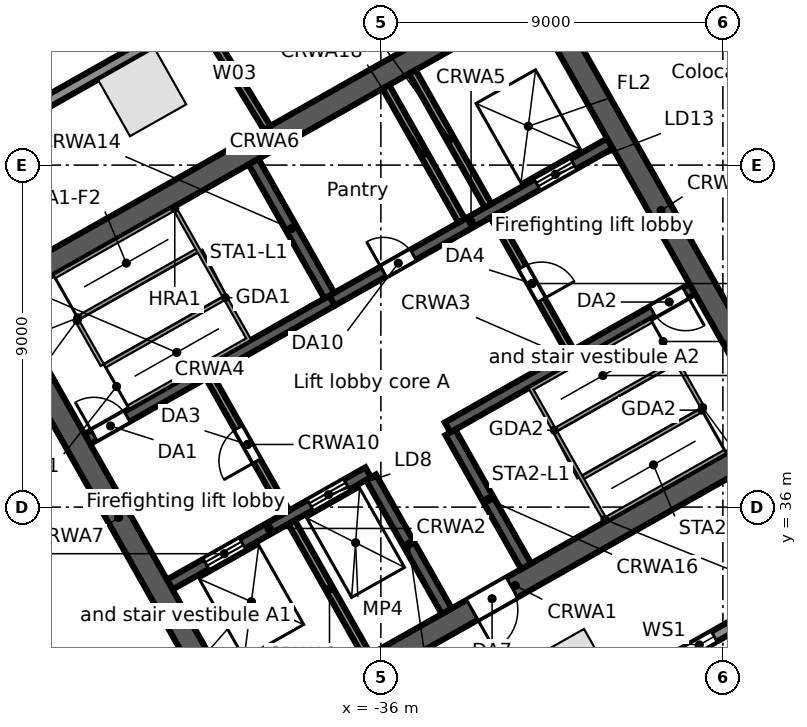
"""IFC4 building model, lengths in metres.
Left out: names, types, materials, properties, quantities, classifications, styles, units other than length and angle.
Written with IfcOpenShell. Run it as: python <this file> out.ifc"""

import sys

from ifc_helpers import new_model, si_unit, direction, frame, frame_2d, origin, origin_2d, place, context, subcontext, project, spatial, rectangle, extrude, element, fill, save


model = new_model("IFC4")
c1 = context("Model", 3, precision=1e-05, world=origin(), true_north=direction((0.0, 1.0)))
c2 = subcontext(c1, "Body", "Model", "MODEL_VIEW")
j1 = project(units=[si_unit("LENGTHUNIT", "METRE"), si_unit("PLANEANGLEUNIT", "RADIAN")], contexts=[c1])
p1 = place(None, origin())
s1 = spatial("IfcSite", under=j1, at=p1, CompositionType="ELEMENT")
p2 = place(p1, origin())
s2 = spatial("IfcBuilding", under=s1, at=p2, CompositionType="ELEMENT")
p3 = place(p2, frame((0.0, 0.0, 36.5)))
s3 = spatial("IfcBuildingStorey", under=s2, at=p3, CompositionType="ELEMENT", Elevation=36.5)
for number, where, z_axis, x_axis in (
    (1, (-42.28, 46.919, 0.0), (0.0, 0.0, 1.0), (-0.87, -0.492, 0.0)),
    (2, (-30.976, 31.635, 0.0), (0.0, 0.0, 1.0), (0.87, 0.492, 0.0)),
):
    element("IfcColumn", number, at=place(p3, frame(where, z_axis=z_axis, x_axis=x_axis)), inside=s3, PredefinedType="COLUMN", context=c2, shape_type="SweptSolid", body=[
        extrude(rectangle(XDim=1.7, YDim=1.7, at=origin_2d()), origin(), (0.0, 0.0, 1.0), 5.0),
    ])
p4 = place(p3, frame((-58.745, 38.764, 0.0), z_axis=(0.0, 0.0, 1.0), x_axis=(0.870355811726, 0.492423355453, 0.0)))
e3 = element("IfcWall", 3, at=p4, inside=s3, PredefinedType="STANDARD", context=c2, shape_type="SweptSolid", body=[
    extrude(rectangle(XDim=64.025, YDim=0.3, at=frame_2d((32.013, 0.0))), origin(), (0.0, 0.0, 1.0), 4.68),
])
p5 = place(p4, frame((60.122, 0.0, 0.6)))
e4 = element("IfcOpeningElement", 4, at=p5, cuts=e3, PredefinedType="OPENING", context=c2, shape_type="SweptSolid", body=[
    extrude(rectangle(XDim=0.9, YDim=3.2, at=frame_2d((0.45, 1.6))), frame((0.0, 0.16, 0.0), z_axis=(0.0, -1.0, 0.0), x_axis=(1.0, 0.0, 0.0)), (0.0, 0.0, 1.0), 0.32),
])
p6 = place(p4, frame((50.992, 0.0, 0.6)))
e5 = element("IfcOpeningElement", 5, at=p6, cuts=e3, PredefinedType="OPENING", context=c2, shape_type="SweptSolid", body=[
    extrude(rectangle(XDim=0.9, YDim=3.2, at=frame_2d((0.45, 1.6))), frame((0.0, 0.16, 0.0), z_axis=(0.0, -1.0, 0.0), x_axis=(1.0, 0.0, 0.0)), (0.0, 0.0, 1.0), 0.32),
])
p7 = place(p4, frame((41.862, 0.0, 0.6)))
e6 = element("IfcOpeningElement", 6, at=p7, cuts=e3, PredefinedType="OPENING", context=c2, shape_type="SweptSolid", body=[
    extrude(rectangle(XDim=0.9, YDim=3.2, at=frame_2d((0.45, 1.6))), frame((0.0, 0.16, 0.0), z_axis=(0.0, -1.0, 0.0), x_axis=(1.0, 0.0, 0.0)), (0.0, 0.0, 1.0), 0.32),
])
p8 = place(p4, frame((32.732, 0.0, 0.6)))
e7 = element("IfcOpeningElement", 7, at=p8, cuts=e3, PredefinedType="OPENING", context=c2, shape_type="SweptSolid", body=[
    extrude(rectangle(XDim=0.9, YDim=3.2, at=frame_2d((0.45, 1.6))), frame((0.0, 0.16, 0.0), z_axis=(0.0, -1.0, 0.0), x_axis=(1.0, 0.0, 0.0)), (0.0, 0.0, 1.0), 0.32),
])
p9 = place(p4, frame((23.602, 0.0, 0.6)))
e8 = element("IfcOpeningElement", 8, at=p9, cuts=e3, PredefinedType="OPENING", context=c2, shape_type="SweptSolid", body=[
    extrude(rectangle(XDim=0.9, YDim=3.2, at=frame_2d((0.45, 1.6))), frame((0.0, 0.16, 0.0), z_axis=(0.0, -1.0, 0.0), x_axis=(1.0, 0.0, 0.0)), (0.0, 0.0, 1.0), 0.32),
])
p10 = place(p4, frame((14.472, 0.0, 0.6)))
e9 = element("IfcOpeningElement", 9, at=p10, cuts=e3, PredefinedType="OPENING", context=c2, shape_type="SweptSolid", body=[
    extrude(rectangle(XDim=0.9, YDim=3.2, at=frame_2d((0.45, 1.6))), frame((0.0, 0.16, 0.0), z_axis=(0.0, -1.0, 0.0), x_axis=(1.0, 0.0, 0.0)), (0.0, 0.0, 1.0), 0.32),
])
p11 = place(p4, frame((5.342, 0.0, 0.6)))
e10 = element("IfcOpeningElement", 10, at=p11, cuts=e3, PredefinedType="OPENING", context=c2, shape_type="SweptSolid", body=[
    extrude(rectangle(XDim=0.9, YDim=3.2, at=frame_2d((0.45, 1.6))), frame((0.0, 0.16, 0.0), z_axis=(0.0, -1.0, 0.0), x_axis=(1.0, 0.0, 0.0)), (0.0, 0.0, 1.0), 0.32),
])
p12 = place(p3, frame((-44.109, 26.504, 0.0), z_axis=(0.0, 0.0, 1.0), x_axis=(-0.857169502585, 0.515034410344, 0.0)))
e11 = element("IfcWall", 11, at=p12, inside=s3, PredefinedType="STANDARD", context=c2, shape_type="SweptSolid", body=[
    extrude(rectangle(XDim=17.127, YDim=0.3, at=frame_2d((8.563, 0.0))), origin(), (0.0, 0.0, 1.0), 4.68),
])
p13 = place(p12, frame((13.403, 0.0, 0.6)))
e12 = element("IfcOpeningElement", 12, at=p13, cuts=e11, PredefinedType="OPENING", context=c2, shape_type="SweptSolid", body=[
    extrude(rectangle(XDim=0.9, YDim=3.2, at=frame_2d((0.45, 1.6))), frame((0.0, 0.16, 0.0), z_axis=(0.0, -1.0, 0.0), x_axis=(1.0, 0.0, 0.0)), (0.0, 0.0, 1.0), 0.32),
])
p14 = place(p12, frame((4.903, 0.0, 0.6)))
e13 = element("IfcOpeningElement", 13, at=p14, cuts=e11, PredefinedType="OPENING", context=c2, shape_type="SweptSolid", body=[
    extrude(rectangle(XDim=0.9, YDim=3.2, at=frame_2d((0.45, 1.6))), frame((0.0, 0.16, 0.0), z_axis=(0.0, -1.0, 0.0), x_axis=(1.0, 0.0, 0.0)), (0.0, 0.0, 1.0), 0.32),
])
p15 = place(p3, frame((-0.055, 47.969, 0.0), z_axis=(0.0, 0.0, 1.0), x_axis=(-0.870355730478, -0.492423499058, 0.0)))
e14 = element("IfcWall", 14, at=p15, inside=s3, PredefinedType="STANDARD", context=c2, shape_type="SweptSolid", body=[
    extrude(rectangle(XDim=43.75, YDim=0.3, at=frame_2d((21.875, 0.0))), origin(), (0.0, 0.0, 1.0), 4.68),
])
p16 = place(p15, frame((39.977, 0.0, 0.6)))
e15 = element("IfcOpeningElement", 15, at=p16, cuts=e14, PredefinedType="OPENING", context=c2, shape_type="SweptSolid", body=[
    extrude(rectangle(XDim=0.9, YDim=3.2, at=frame_2d((0.45, 1.6))), frame((0.0, 0.16, 0.0), z_axis=(0.0, -1.0, 0.0), x_axis=(1.0, 0.0, 0.0)), (0.0, 0.0, 1.0), 0.32),
])
p17 = place(p15, frame((31.222, 0.0, 0.6)))
e16 = element("IfcOpeningElement", 16, at=p17, cuts=e14, PredefinedType="OPENING", context=c2, shape_type="SweptSolid", body=[
    extrude(rectangle(XDim=0.9, YDim=3.2, at=frame_2d((0.45, 1.6))), frame((0.0, 0.16, 0.0), z_axis=(0.0, -1.0, 0.0), x_axis=(1.0, 0.0, 0.0)), (0.0, 0.0, 1.0), 0.32),
])
p18 = place(p15, frame((22.468, 0.0, 0.6)))
e17 = element("IfcOpeningElement", 17, at=p18, cuts=e14, PredefinedType="OPENING", context=c2, shape_type="SweptSolid", body=[
    extrude(rectangle(XDim=0.9, YDim=3.2, at=frame_2d((0.45, 1.6))), frame((0.0, 0.16, 0.0), z_axis=(0.0, -1.0, 0.0), x_axis=(1.0, 0.0, 0.0)), (0.0, 0.0, 1.0), 0.32),
])
p19 = place(p15, frame((13.713, 0.0, 0.6)))
e18 = element("IfcOpeningElement", 18, at=p19, cuts=e14, PredefinedType="OPENING", context=c2, shape_type="SweptSolid", body=[
    extrude(rectangle(XDim=0.9, YDim=3.2, at=frame_2d((0.45, 1.6))), frame((0.0, 0.16, 0.0), z_axis=(0.0, -1.0, 0.0), x_axis=(1.0, 0.0, 0.0)), (0.0, 0.0, 1.0), 0.32),
])
p20 = place(p15, frame((4.959, 0.0, 0.6)))
e19 = element("IfcOpeningElement", 19, at=p20, cuts=e14, PredefinedType="OPENING", context=c2, shape_type="SweptSolid", body=[
    extrude(rectangle(XDim=0.9, YDim=3.2, at=frame_2d((0.45, 1.6))), frame((0.0, 0.16, 0.0), z_axis=(0.0, -1.0, 0.0), x_axis=(1.0, 0.0, 0.0)), (0.0, 0.0, 1.0), 0.32),
])
p21 = place(p3, frame((-39.862, 29.749, 0.0), z_axis=(0.0, 0.0, 1.0), x_axis=(0.870350116061, 0.492433422375, 0.0)))
e20 = element("IfcWall", 20, at=p21, inside=s3, PredefinedType="SOLIDWALL", context=c2, shape_type="SweptSolid", body=[
    extrude(rectangle(XDim=17.0, YDim=0.6, at=frame_2d((8.5, 0.0))), origin(), (0.0, 0.0, 1.0), 4.68),
])
p22 = place(p21, frame((7.2, 0.0, 0.0)))
e21 = element("IfcOpeningElement", 21, at=p22, cuts=e20, PredefinedType="OPENING", context=c2, shape_type="SweptSolid", body=[
    extrude(rectangle(XDim=1.2, YDim=2.1, at=frame_2d((0.6, 1.05))), frame((0.0, 0.31, 0.0), z_axis=(0.0, -1.0, 0.0), x_axis=(1.0, 0.0, 0.0)), (0.0, 0.0, 1.0), 0.62),
])
p23 = place(p3, frame((-41.556, 33.961, 0.0), z_axis=(0.0, 0.0, 1.0), x_axis=(0.870343731308, 0.492444706919, 0.0)))
e22 = element("IfcWall", 22, at=p23, inside=s3, PredefinedType="SOLIDWALL", context=c2, shape_type="SweptSolid", body=[
    extrude(rectangle(XDim=6.0, YDim=0.3, at=frame_2d((3.0, 0.0))), origin(), (0.0, 0.0, 1.0), 4.68),
])
p24 = place(p23, frame((1.1, 0.0, 0.0)))
e23 = element("IfcOpeningElement", 23, at=p24, cuts=e22, PredefinedType="OPENING", context=c2, shape_type="SweptSolid", body=[
    extrude(rectangle(XDim=1.1, YDim=2.1, at=frame_2d((0.55, 1.05))), frame((0.0, 0.16, 0.0), z_axis=(0.0, -1.0, 0.0), x_axis=(1.0, 0.0, 0.0)), (0.0, 0.0, 1.0), 0.32),
])
p25 = place(p23, frame((4.25, 0.0, 0.0)))
e24 = element("IfcOpeningElement", 24, at=p25, cuts=e22, PredefinedType="OPENING", context=c2, shape_type="SweptSolid", body=[
    extrude(rectangle(XDim=1.1, YDim=2.1, at=frame_2d((0.55, 1.05))), frame((0.0, 0.16, 0.0), z_axis=(0.0, -1.0, 0.0), x_axis=(1.0, 0.0, 0.0)), (0.0, 0.0, 1.0), 0.32),
])
p26 = place(p3, frame((-34.245, 38.097, 0.0), z_axis=(0.0, 0.0, 1.0), x_axis=(0.870364910201, 0.492407273597, 0.0)))
e25 = element("IfcWall", 25, at=p26, inside=s3, PredefinedType="SOLIDWALL", context=c2, shape_type="SweptSolid", body=[
    extrude(rectangle(XDim=7.4, YDim=0.3, at=frame_2d((3.7, 0.0))), origin(), (0.0, 0.0, 1.0), 4.68),
])
p27 = place(p26, frame((6.2, 0.0, 0.0)))
e26 = element("IfcOpeningElement", 26, at=p27, cuts=e25, PredefinedType="OPENING", context=c2, shape_type="SweptSolid", body=[
    extrude(rectangle(XDim=1.0, YDim=2.1, at=frame_2d((0.5, 1.05))), frame((0.0, 0.16, 0.0), z_axis=(0.0, -1.0, 0.0), x_axis=(1.0, 0.0, 0.0)), (0.0, 0.0, 1.0), 0.32),
])
p28 = place(p3, frame((-43.723, 37.791, 0.0), z_axis=(0.0, 0.0, 1.0), x_axis=(0.87035077051, 0.49243226567, 0.0)))
e27 = element("IfcWall", 27, at=p28, inside=s3, PredefinedType="SOLIDWALL", context=c2, shape_type="SweptSolid", body=[
    extrude(rectangle(XDim=7.4, YDim=0.3, at=frame_2d((3.7, 0.0))), origin(), (0.0, 0.0, 1.0), 4.68),
])
p29 = place(p28, frame((0.2, 0.0, 0.0)))
e28 = element("IfcOpeningElement", 28, at=p29, cuts=e27, PredefinedType="OPENING", context=c2, shape_type="SweptSolid", body=[
    extrude(rectangle(XDim=1.0, YDim=2.1, at=frame_2d((0.5, 1.05))), frame((0.0, 0.16, 0.0), z_axis=(0.0, -1.0, 0.0), x_axis=(1.0, 0.0, 0.0)), (0.0, 0.0, 1.0), 0.32),
])
p30 = place(p3, frame((-37.282, 41.435, 0.0), z_axis=(0.0, 0.0, 1.0), x_axis=(0.870356516133, 0.492422110414, 0.0)))
e29 = element("IfcWall", 29, at=p30, inside=s3, PredefinedType="SOLIDWALL", context=c2, shape_type="SweptSolid", body=[
    extrude(rectangle(XDim=8.4, YDim=0.3, at=frame_2d((4.2, 0.0))), origin(), (0.0, 0.0, 1.0), 4.68),
])
p31 = place(p30, frame((6.2, 0.0, 0.0)))
e30 = element("IfcOpeningElement", 30, at=p31, cuts=e29, PredefinedType="OPENING", context=c2, shape_type="SweptSolid", body=[
    extrude(rectangle(XDim=1.1, YDim=2.1, at=frame_2d((0.55, 1.05))), frame((0.0, 0.16, 0.0), z_axis=(0.0, -1.0, 0.0), x_axis=(1.0, 0.0, 0.0)), (0.0, 0.0, 1.0), 0.32),
])
p32 = place(p30, frame((1.55, 0.0, 0.0)))
e31 = element("IfcOpeningElement", 31, at=p32, cuts=e29, PredefinedType="OPENING", context=c2, shape_type="SweptSolid", body=[
    extrude(rectangle(XDim=0.9, YDim=2.1, at=frame_2d((0.45, 1.05))), frame((0.0, 0.16, 0.0), z_axis=(0.0, -1.0, 0.0), x_axis=(1.0, 0.0, 0.0)), (0.0, 0.0, 1.0), 0.32),
])
p33 = place(p3, frame((-46.461, 41.412, 0.0), z_axis=(0.0, 0.0, 1.0), x_axis=(0.870350116061, 0.492433422375, 0.0)))
e32 = element("IfcWall", 32, at=p33, inside=s3, PredefinedType="SOLIDWALL", context=c2, shape_type="SweptSolid", body=[
    extrude(rectangle(XDim=17.0, YDim=0.6, at=frame_2d((8.5, 0.0))), origin(), (0.0, 0.0, 1.0), 4.68),
])
p34 = place(p3, frame((-46.052, 41.298, 0.0), z_axis=(0.0, 0.0, 1.0), x_axis=(0.492418598281, -0.870358503186, 0.0)))
e33 = element("IfcWall", 33, at=p34, inside=s3, PredefinedType="SOLIDWALL", context=c2, shape_type="SweptSolid", body=[
    extrude(rectangle(XDim=12.8, YDim=0.6, at=frame_2d((6.4, 0.0))), origin(), (0.0, 0.0, 1.0), 4.68),
])
p35 = place(p3, frame((-38.349, 35.603, 0.0), z_axis=(0.0, 0.0, 1.0), x_axis=(0.49241474071, -0.870360685654, 0.0)))
e34 = element("IfcWall", 34, at=p35, inside=s3, PredefinedType="SOLIDWALL", context=c2, shape_type="SweptSolid", body=[
    extrude(rectangle(XDim=4.05, YDim=0.2, at=frame_2d((2.025, 0.0))), origin(), (0.0, 0.0, 1.0), 4.68),
])
p36 = place(p3, frame((-40.516, 39.433, 0.0), z_axis=(0.0, 0.0, 1.0), x_axis=(0.492453559952, -0.87033872216, 0.0)))
e35 = element("IfcWall", 35, at=p36, inside=s3, PredefinedType="PARTITIONING", context=c2, shape_type="SweptSolid", body=[
    extrude(rectangle(XDim=4.1, YDim=0.2, at=frame_2d((2.05, 0.0))), origin(), (0.0, 0.0, 1.0), 4.68),
])
p37 = place(p36, frame((1.55, 0.0, 0.0)))
e36 = element("IfcOpeningElement", 36, at=p37, cuts=e35, PredefinedType="OPENING", context=c2, shape_type="SweptSolid", body=[
    extrude(rectangle(XDim=1.0, YDim=2.1, at=frame_2d((0.5, 1.05))), frame((0.0, 0.11, 0.0), z_axis=(0.0, -1.0, 0.0), x_axis=(1.0, 0.0, 0.0)), (0.0, 0.0, 1.0), 0.22),
])
p38 = place(p3, frame((-36.26, 36.785, 0.0), z_axis=(0.0, 0.0, 1.0), x_axis=(0.492440575896, -0.870346068648, 0.0)))
e37 = element("IfcWall", 37, at=p38, inside=s3, PredefinedType="SOLIDWALL", context=c2, shape_type="SweptSolid", body=[
    extrude(rectangle(XDim=4.05, YDim=0.3, at=frame_2d((2.025, 0.0))), origin(), (0.0, 0.0, 1.0), 4.68),
])
p39 = place(p3, frame((-39.35, 45.09, 0.0), z_axis=(0.0, 0.0, 1.0), x_axis=(0.49241474071, -0.870360685654, 0.0)))
e38 = element("IfcWall", 38, at=p39, inside=s3, PredefinedType="SOLIDWALL", context=c2, shape_type="SweptSolid", body=[
    extrude(rectangle(XDim=4.05, YDim=0.3, at=frame_2d((2.025, 0.0))), origin(), (0.0, 0.0, 1.0), 4.68),
])
p40 = place(p3, frame((-34.171, 37.967, 0.0), z_axis=(0.0, 0.0, 1.0), x_axis=(0.492394910396, -0.870371904542, 0.0)))
e39 = element("IfcWall", 39, at=p40, inside=s3, PredefinedType="SOLIDWALL", context=c2, shape_type="SweptSolid", body=[
    extrude(rectangle(XDim=4.05, YDim=0.3, at=frame_2d((2.025, 0.0))), origin(), (0.0, 0.0, 1.0), 4.68),
])
p41 = place(p3, frame((-35.869, 47.06, 0.0), z_axis=(0.0, 0.0, 1.0), x_axis=(0.49241474071, -0.870360685654, 0.0)))
e40 = element("IfcWall", 40, at=p41, inside=s3, PredefinedType="SOLIDWALL", context=c2, shape_type="SweptSolid", body=[
    extrude(rectangle(XDim=4.05, YDim=0.2, at=frame_2d((2.025, 0.0))), origin(), (0.0, 0.0, 1.0), 4.68),
])
p42 = place(p3, frame((-33.031, 43.667, 0.0), z_axis=(0.0, 0.0, 1.0), x_axis=(0.492408451753, -0.87036424366, 0.0)))
e41 = element("IfcWall", 41, at=p42, inside=s3, PredefinedType="PARTITIONING", context=c2, shape_type="SweptSolid", body=[
    extrude(rectangle(XDim=4.1, YDim=0.2, at=frame_2d((2.05, 0.0))), origin(), (0.0, 0.0, 1.0), 4.68),
])
p43 = place(p42, frame((1.55, 0.0, 0.0)))
e42 = element("IfcOpeningElement", 42, at=p43, cuts=e41, PredefinedType="OPENING", context=c2, shape_type="SweptSolid", body=[
    extrude(rectangle(XDim=1.0, YDim=2.1, at=frame_2d((0.5, 1.05))), frame((0.0, 0.11, 0.0), z_axis=(0.0, -1.0, 0.0), x_axis=(1.0, 0.0, 0.0)), (0.0, 0.0, 1.0), 0.22),
])
p44 = place(p3, frame((-35.173, 47.454, 0.0), z_axis=(0.0, 0.0, 1.0), x_axis=(0.492440575896, -0.870346068648, 0.0)))
e43 = element("IfcWall", 43, at=p44, inside=s3, PredefinedType="SOLIDWALL", context=c2, shape_type="SweptSolid", body=[
    extrude(rectangle(XDim=4.05, YDim=0.2, at=frame_2d((2.025, 0.0))), origin(), (0.0, 0.0, 1.0), 4.68),
])
p45 = place(p3, frame((-31.778, 49.374, 0.0), z_axis=(0.0, 0.0, 1.0), x_axis=(0.492433046652, -0.870350328641, 0.0)))
e44 = element("IfcWall", 44, at=p45, inside=s3, PredefinedType="SOLIDWALL", context=c2, shape_type="SweptSolid", body=[
    extrude(rectangle(XDim=12.8, YDim=0.6, at=frame_2d((6.4, 0.0))), origin(), (0.0, 0.0, 1.0), 4.68),
])
p46 = place(p3, frame((-40.713, 48.794, 0.0), z_axis=(0.0, 0.0, 1.0), x_axis=(0.52165366254, -0.853157345604, 0.0)))
e45 = element("IfcWall", 45, at=p46, inside=s3, PredefinedType="PARTITIONING", context=c2, shape_type="SweptSolid", body=[
    extrude(rectangle(XDim=3.297, YDim=0.2, at=frame_2d((1.648, 0.0))), origin(), (0.0, 0.0, 1.0), 3.96),
])
p47 = place(p17, origin())
e46 = element("IfcWindow", 46, at=p47, inside=s3, PartitioningType="SINGLE_PANEL", PredefinedType="WINDOW", context=c2, shape_type="SweptSolid", body=[
    extrude(rectangle(XDim=0.9, YDim=3.2, at=frame_2d((0.45, 1.6))), frame((0.0, 0.03, 0.0), z_axis=(0.0, -1.0, 0.0), x_axis=(1.0, 0.0, 0.0)), (0.0, 0.0, 1.0), 0.06),
])
fill(e16, e46)
p48 = place(p31, origin())
e47 = element("IfcDoor", 47, at=p48, inside=s3, OperationType="DOUBLE_DOOR_SLIDING", PredefinedType="DOOR", context=c2, shape_type="SweptSolid", body=[
    extrude(rectangle(XDim=1.1, YDim=2.1, at=frame_2d((0.55, 1.05))), frame((0.0, 0.025, 0.0), z_axis=(0.0, -1.0, 0.0), x_axis=(1.0, 0.0, 0.0)), (0.0, 0.0, 1.0), 0.05),
])
fill(e30, e47)
p49 = place(p24, origin())
e48 = element("IfcDoor", 48, at=p49, inside=s3, OperationType="DOUBLE_DOOR_SLIDING", PredefinedType="DOOR", context=c2, shape_type="SweptSolid", body=[
    extrude(rectangle(XDim=1.1, YDim=2.1, at=frame_2d((0.55, 1.05))), frame((0.0, 0.025, 0.0), z_axis=(0.0, -1.0, 0.0), x_axis=(1.0, 0.0, 0.0)), (0.0, 0.0, 1.0), 0.05),
])
fill(e23, e48)
p50 = place(p25, origin())
e49 = element("IfcDoor", 49, at=p50, inside=s3, OperationType="DOUBLE_DOOR_SLIDING", PredefinedType="DOOR", context=c2, shape_type="SweptSolid", body=[
    extrude(rectangle(XDim=1.1, YDim=2.1, at=frame_2d((0.55, 1.05))), frame((0.0, 0.025, 0.0), z_axis=(0.0, -1.0, 0.0), x_axis=(1.0, 0.0, 0.0)), (0.0, 0.0, 1.0), 0.05),
])
fill(e24, e49)
p51 = place(p29, origin())
e50 = element("IfcDoor", 50, at=p51, inside=s3, OperationType="SINGLE_SWING_LEFT", PredefinedType="DOOR", context=c2, shape_type="SweptSolid", body=[
    extrude(rectangle(XDim=1.0, YDim=2.1, at=frame_2d((0.5, 1.05))), frame((0.0, 0.025, 0.0), z_axis=(0.0, -1.0, 0.0), x_axis=(1.0, 0.0, 0.0)), (0.0, 0.0, 1.0), 0.05),
])
fill(e28, e50)
p52 = place(p27, frame((1.0, 0.0, 0.0), z_axis=(0.0, 0.0, 1.0), x_axis=(-1.0, 0.0, 0.0)))
e51 = element("IfcDoor", 51, at=p52, inside=s3, OperationType="SINGLE_SWING_LEFT", PredefinedType="DOOR", context=c2, shape_type="SweptSolid", body=[
    extrude(rectangle(XDim=1.0, YDim=2.1, at=frame_2d((0.5, 1.05))), frame((0.0, 0.025, 0.0), z_axis=(0.0, -1.0, 0.0), x_axis=(1.0, 0.0, 0.0)), (0.0, 0.0, 1.0), 0.05),
])
fill(e26, e51)
p53 = place(p37, frame((1.0, 0.0, 0.0), z_axis=(0.0, 0.0, 1.0), x_axis=(-1.0, 0.0, 0.0)))
e52 = element("IfcDoor", 52, at=p53, inside=s3, OperationType="SINGLE_SWING_LEFT", PredefinedType="DOOR", context=c2, shape_type="SweptSolid", body=[
    extrude(rectangle(XDim=1.0, YDim=2.1, at=frame_2d((0.5, 1.05))), frame((0.0, 0.025, 0.0), z_axis=(0.0, -1.0, 0.0), x_axis=(1.0, 0.0, 0.0)), (0.0, 0.0, 1.0), 0.05),
])
fill(e36, e52)
p54 = place(p43, origin())
e53 = element("IfcDoor", 53, at=p54, inside=s3, OperationType="SINGLE_SWING_RIGHT", PredefinedType="DOOR", context=c2, shape_type="SweptSolid", body=[
    extrude(rectangle(XDim=1.0, YDim=2.1, at=frame_2d((0.5, 1.05))), frame((0.0, 0.025, 0.0), z_axis=(0.0, -1.0, 0.0), x_axis=(1.0, 0.0, 0.0)), (0.0, 0.0, 1.0), 0.05),
])
fill(e42, e53)
p55 = place(p22, frame((1.2, 0.0, 0.0), z_axis=(0.0, 0.0, 1.0), x_axis=(-1.0, 0.0, 0.0)))
e54 = element("IfcDoor", 54, at=p55, inside=s3, OperationType="SINGLE_SWING_RIGHT", PredefinedType="DOOR", context=c2, shape_type="SweptSolid", body=[
    extrude(rectangle(XDim=1.2, YDim=2.1, at=frame_2d((0.6, 1.05))), frame((0.0, 0.025, 0.0), z_axis=(0.0, -1.0, 0.0), x_axis=(1.0, 0.0, 0.0)), (0.0, 0.0, 1.0), 0.05),
])
fill(e21, e54)
p56 = place(p32, origin())
e55 = element("IfcDoor", 55, at=p56, inside=s3, OperationType="SINGLE_SWING_LEFT", PredefinedType="DOOR", context=c2, shape_type="SweptSolid", body=[
    extrude(rectangle(XDim=0.9, YDim=2.1, at=frame_2d((0.45, 1.05))), frame((0.0, 0.025, 0.0), z_axis=(0.0, -1.0, 0.0), x_axis=(1.0, 0.0, 0.0)), (0.0, 0.0, 1.0), 0.05),
])
fill(e31, e55)
save(model, sys.argv[1])
